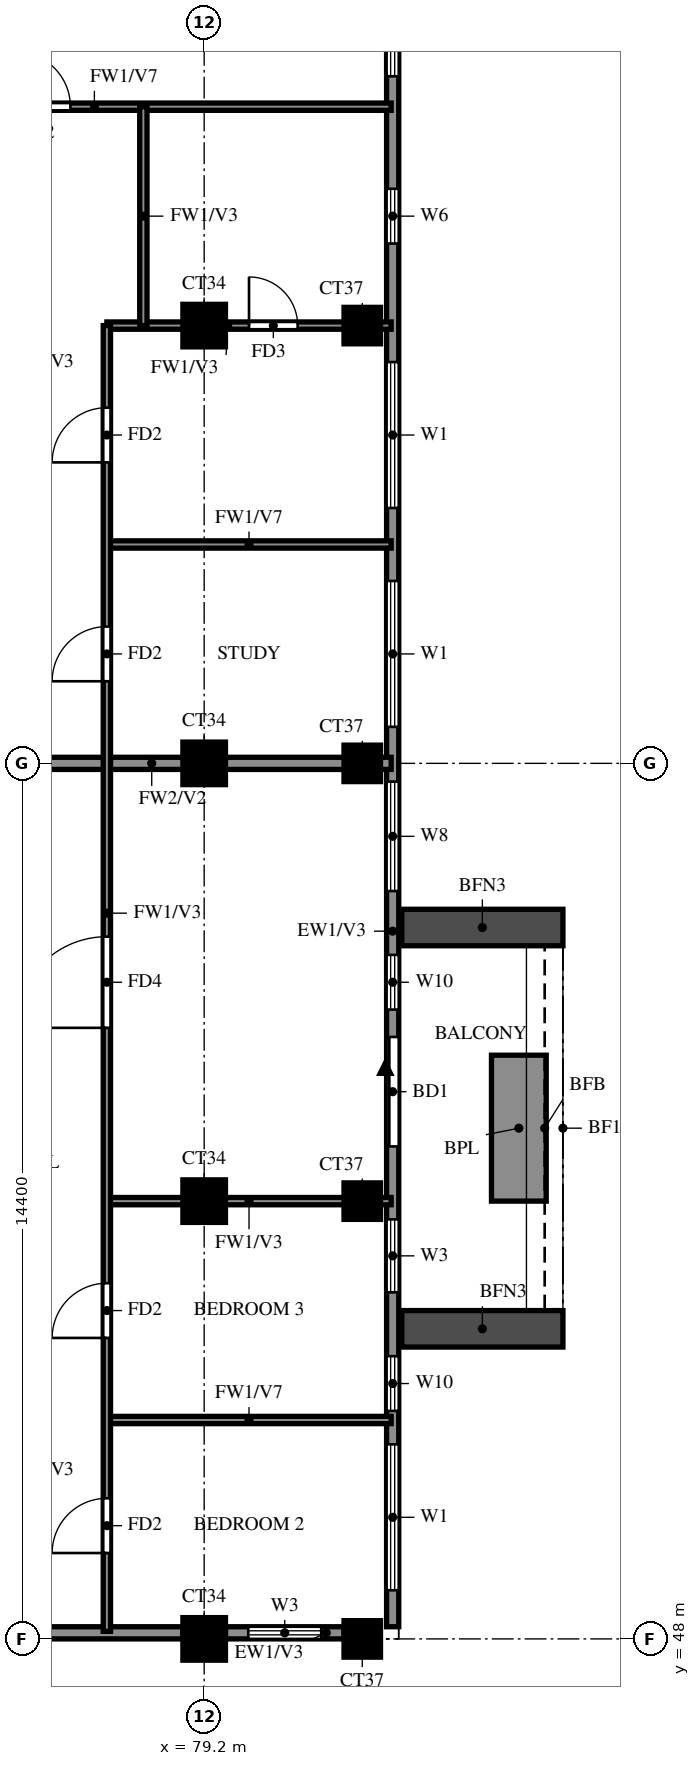
"""IFC4 building model, lengths in metres.
Left out: names, types, materials, properties, quantities, classifications, styles, units other than length and angle.
Written with IfcOpenShell. Run it as: python <this file> out.ifc"""

import sys

from ifc_helpers import new_model, si_unit, direction, frame, frame_2d, origin, origin_2d, place, context, subcontext, project, spatial, rectangle, extrude, source, transform, mapped, element, fill, save


model = new_model("IFC4")
c1 = context("Model", 3, precision=1e-05, world=origin(), true_north=direction((0.0, 1.0)))
c2 = subcontext(c1, "Body", "Model", "MODEL_VIEW")
j1 = project(units=[si_unit("LENGTHUNIT", "METRE"), si_unit("PLANEANGLEUNIT", "RADIAN")], contexts=[c1])
p1 = place(None, origin())
s1 = spatial("IfcSite", under=j1, at=p1, CompositionType="ELEMENT")
p2 = place(p1, origin())
s2 = spatial("IfcBuilding", under=s1, at=p2, CompositionType="ELEMENT")
p3 = place(p2, frame((0.0, 0.0, 257.0)))
s3 = spatial("IfcBuildingStorey", under=s2, at=p3, CompositionType="ELEMENT", Elevation=257.0)
m1 = source(origin(), c2, "Body", "SweptSolid", [
    extrude(rectangle(XDim=0.7, YDim=0.7, at=origin_2d()), origin(), (0.0, 0.0, 1.0), 3.22),
])
p4 = place(p3, frame((79.2, 48.0, 0.0), z_axis=(0.0, 0.0, 1.0), x_axis=(1.0, 0.0, 0.0)))
e1 = element("IfcColumn", 1, at=p4, inside=s3, PredefinedType="COLUMN", context=c2, shape_type="MappedRepresentation", body=[
    mapped(m1, transform((0.0, 0.0, 0.0))),
])
m2 = source(origin(), c2, "Body", "SweptSolid", [
    extrude(rectangle(XDim=0.6, YDim=0.6, at=origin_2d()), origin(), (0.0, 0.0, 1.0), 3.22),
])
p5 = place(p3, frame((81.8, 48.0, 0.0), z_axis=(0.0, 0.0, 1.0), x_axis=(1.0, 0.0, 0.0)))
e2 = element("IfcColumn", 2, at=p5, inside=s3, PredefinedType="COLUMN", context=c2, shape_type="MappedRepresentation", body=[
    mapped(m2, transform((0.0, 0.0, 0.0))),
])
p6 = place(p3, frame((79.2, 55.2, 0.0), z_axis=(0.0, 0.0, 1.0), x_axis=(1.0, 0.0, 0.0)))
e3 = element("IfcColumn", 3, at=p6, inside=s3, PredefinedType="COLUMN", context=c2, shape_type="MappedRepresentation", body=[
    mapped(m1, transform((0.0, 0.0, 0.0))),
])
p7 = place(p3, frame((81.8, 55.2, 0.0), z_axis=(0.0, 0.0, 1.0), x_axis=(1.0, 0.0, 0.0)))
e4 = element("IfcColumn", 4, at=p7, inside=s3, PredefinedType="COLUMN", context=c2, shape_type="MappedRepresentation", body=[
    mapped(m2, transform((0.0, 0.0, 0.0))),
])
p8 = place(p3, frame((79.2, 62.4, 0.0), z_axis=(0.0, 0.0, 1.0), x_axis=(1.0, 0.0, 0.0)))
e5 = element("IfcColumn", 5, at=p8, inside=s3, PredefinedType="COLUMN", context=c2, shape_type="MappedRepresentation", body=[
    mapped(m1, transform((0.0, 0.0, 0.0))),
])
p9 = place(p3, frame((81.8, 62.4, 0.0), z_axis=(0.0, 0.0, 1.0), x_axis=(1.0, 0.0, 0.0)))
e6 = element("IfcColumn", 6, at=p9, inside=s3, PredefinedType="COLUMN", context=c2, shape_type="MappedRepresentation", body=[
    mapped(m2, transform((0.0, 0.0, 0.0))),
])
p10 = place(p3, frame((79.2, 69.6, 0.0), z_axis=(0.0, 0.0, 1.0), x_axis=(1.0, 0.0, 0.0)))
e7 = element("IfcColumn", 7, at=p10, inside=s3, PredefinedType="COLUMN", context=c2, shape_type="MappedRepresentation", body=[
    mapped(m1, transform((0.0, 0.0, 0.0))),
])
p11 = place(p3, frame((81.8, 69.6, 0.0), z_axis=(0.0, 0.0, 1.0), x_axis=(1.0, 0.0, 0.0)))
e8 = element("IfcColumn", 8, at=p11, inside=s3, PredefinedType="COLUMN", context=c2, shape_type="MappedRepresentation", body=[
    mapped(m2, transform((0.0, 0.0, 0.0))),
])
p12 = place(p3, frame((81.907, 39.87, 0.0), z_axis=(0.0, 0.0, 1.0), x_axis=(-0.777936274417, 0.62834318087, 0.0)))
e9 = element("IfcWall", 9, at=p12, inside=s3, PredefinedType="SOLIDWALL", context=c2, shape_type="SweptSolid", body=[
    extrude(rectangle(XDim=13.099, YDim=0.2, at=frame_2d((6.549, 0.0))), origin(), (0.0, 0.0, 1.0), 3.22),
])
p13 = place(p12, frame((9.938, 0.0, 1.5)))
e10 = element("IfcOpeningElement", 10, at=p13, cuts=e9, PredefinedType="OPENING", context=c2, shape_type="SweptSolid", body=[
    extrude(rectangle(XDim=0.9, YDim=0.9, at=frame_2d((0.45, 0.45))), frame((0.0, 0.11, 0.0), z_axis=(0.0, -1.0, 0.0), x_axis=(1.0, 0.0, 0.0)), (0.0, 0.0, 1.0), 0.22),
])
p14 = place(p3, frame((71.987, 48.1, 0.0), z_axis=(0.0, 0.0, 1.0), x_axis=(1.0, 0.0, 0.0)))
e11 = element("IfcWall", 11, at=p14, inside=s3, PredefinedType="SOLIDWALL", context=c2, shape_type="SweptSolid", body=[
    extrude(rectangle(XDim=6.863, YDim=0.2, at=frame_2d((3.432, 0.0))), origin(), (0.0, 0.0, 1.0), 3.22),
])
p15 = place(p3, frame((79.55, 48.1, 0.0), z_axis=(0.0, 0.0, 1.0), x_axis=(1.0, 0.0, 0.0)))
e12 = element("IfcWall", 12, at=p15, inside=s3, PredefinedType="SOLIDWALL", context=c2, shape_type="SweptSolid", body=[
    extrude(rectangle(XDim=1.95, YDim=0.2, at=frame_2d((0.975, 0.0))), origin(), (0.0, 0.0, 1.0), 3.22),
])
p16 = place(p15, frame((0.375, 0.0, 0.6)))
e13 = element("IfcOpeningElement", 13, at=p16, cuts=e12, PredefinedType="OPENING", context=c2, shape_type="SweptSolid", body=[
    extrude(rectangle(XDim=1.2, YDim=2.4, at=frame_2d((0.6, 1.2))), frame((0.0, 0.11, 0.0), z_axis=(0.0, -1.0, 0.0), x_axis=(1.0, 0.0, 0.0)), (0.0, 0.0, 1.0), 0.22),
])
p17 = place(p3, frame((82.3, 48.2, 0.0), z_axis=(0.0, 0.0, 1.0), x_axis=(0.0, 1.0, 0.0)))
e14 = element("IfcWall", 14, at=p17, inside=s3, PredefinedType="SOLIDWALL", context=c2, shape_type="SweptSolid", body=[
    extrude(rectangle(XDim=28.6, YDim=0.2, at=frame_2d((14.3, 0.0))), origin(), (0.0, 0.0, 1.0), 3.22),
])
p18 = place(p17, frame((7.9, 0.0, 0.0)))
e15 = element("IfcOpeningElement", 15, at=p18, cuts=e14, PredefinedType="OPENING", context=c2, shape_type="SweptSolid", body=[
    extrude(rectangle(XDim=1.8, YDim=2.4, at=frame_2d((0.9, 1.2))), frame((0.0, 0.11, 0.0), z_axis=(0.0, -1.0, 0.0), x_axis=(1.0, 0.0, 0.0)), (0.0, 0.0, 1.0), 0.22),
])
p19 = place(p17, frame((0.6, 0.0, 0.6)))
e16 = element("IfcOpeningElement", 16, at=p19, cuts=e14, PredefinedType="OPENING", context=c2, shape_type="SweptSolid", body=[
    extrude(rectangle(XDim=2.4, YDim=2.4, at=frame_2d((1.2, 1.2))), frame((0.0, 0.11, 0.0), z_axis=(0.0, -1.0, 0.0), x_axis=(1.0, 0.0, 0.0)), (0.0, 0.0, 1.0), 0.22),
])
p20 = place(p17, frame((3.55, 0.0, 0.6)))
e17 = element("IfcOpeningElement", 17, at=p20, cuts=e14, PredefinedType="OPENING", context=c2, shape_type="SweptSolid", body=[
    extrude(rectangle(XDim=0.9, YDim=2.4, at=frame_2d((0.45, 1.2))), frame((0.0, 0.11, 0.0), z_axis=(0.0, -1.0, 0.0), x_axis=(1.0, 0.0, 0.0)), (0.0, 0.0, 1.0), 0.22),
])
p21 = place(p17, frame((5.5, 0.0, 0.6)))
e18 = element("IfcOpeningElement", 18, at=p21, cuts=e14, PredefinedType="OPENING", context=c2, shape_type="SweptSolid", body=[
    extrude(rectangle(XDim=1.2, YDim=2.4, at=frame_2d((0.6, 1.2))), frame((0.0, 0.11, 0.0), z_axis=(0.0, -1.0, 0.0), x_axis=(1.0, 0.0, 0.0)), (0.0, 0.0, 1.0), 0.22),
])
p22 = place(p17, frame((10.15, 0.0, 0.6)))
e19 = element("IfcOpeningElement", 19, at=p22, cuts=e14, PredefinedType="OPENING", context=c2, shape_type="SweptSolid", body=[
    extrude(rectangle(XDim=0.9, YDim=2.4, at=frame_2d((0.45, 1.2))), frame((0.0, 0.11, 0.0), z_axis=(0.0, -1.0, 0.0), x_axis=(1.0, 0.0, 0.0)), (0.0, 0.0, 1.0), 0.22),
])
p23 = place(p17, frame((12.1, 0.0, 0.6)))
e20 = element("IfcOpeningElement", 20, at=p23, cuts=e14, PredefinedType="OPENING", context=c2, shape_type="SweptSolid", body=[
    extrude(rectangle(XDim=1.8, YDim=2.4, at=frame_2d((0.9, 1.2))), frame((0.0, 0.11, 0.0), z_axis=(0.0, -1.0, 0.0), x_axis=(1.0, 0.0, 0.0)), (0.0, 0.0, 1.0), 0.22),
])
p24 = place(p17, frame((14.8, 0.0, 0.6)))
e21 = element("IfcOpeningElement", 21, at=p24, cuts=e14, PredefinedType="OPENING", context=c2, shape_type="SweptSolid", body=[
    extrude(rectangle(XDim=2.4, YDim=2.4, at=frame_2d((1.2, 1.2))), frame((0.0, 0.11, 0.0), z_axis=(0.0, -1.0, 0.0), x_axis=(1.0, 0.0, 0.0)), (0.0, 0.0, 1.0), 0.22),
])
p25 = place(p17, frame((18.4, 0.0, 0.6)))
e22 = element("IfcOpeningElement", 22, at=p25, cuts=e14, PredefinedType="OPENING", context=c2, shape_type="SweptSolid", body=[
    extrude(rectangle(XDim=2.4, YDim=2.4, at=frame_2d((1.2, 1.2))), frame((0.0, 0.11, 0.0), z_axis=(0.0, -1.0, 0.0), x_axis=(1.0, 0.0, 0.0)), (0.0, 0.0, 1.0), 0.22),
])
p26 = place(p17, frame((22.75, 0.0, 1.5)))
e23 = element("IfcOpeningElement", 23, at=p26, cuts=e14, PredefinedType="OPENING", context=c2, shape_type="SweptSolid", body=[
    extrude(rectangle(XDim=0.9, YDim=0.9, at=frame_2d((0.45, 0.45))), frame((0.0, 0.11, 0.0), z_axis=(0.0, -1.0, 0.0), x_axis=(1.0, 0.0, 0.0)), (0.0, 0.0, 1.0), 0.22),
])
p27 = place(p17, frame((25.5, 0.0, 0.6)))
e24 = element("IfcOpeningElement", 24, at=p27, cuts=e14, PredefinedType="OPENING", context=c2, shape_type="SweptSolid", body=[
    extrude(rectangle(XDim=2.4, YDim=2.4, at=frame_2d((1.2, 1.2))), frame((0.0, 0.11, 0.0), z_axis=(0.0, -1.0, 0.0), x_axis=(1.0, 0.0, 0.0)), (0.0, 0.0, 1.0), 0.22),
])
for number, where, z_axis, x_axis in (
    (25, (82.45, 53.1, 0.0), (0.0, 0.0, 1.0), (1.0, 0.0, 0.0)),
    (26, (82.45, 59.7, 0.0), (0.0, 0.0, 1.0), (1.0, 0.0, 0.0)),
):
    element("IfcWall", number, at=place(p3, frame(where, z_axis=z_axis, x_axis=x_axis)), inside=s3, PredefinedType="SOLIDWALL", context=c2, shape_type="SweptSolid", body=[
        extrude(rectangle(XDim=2.65, YDim=0.6, at=frame_2d((1.325, 0.0))), origin(), (0.0, 0.0, 1.0), 2.85),
    ])
p28 = place(p3, frame((84.375, 55.2, 0.0), z_axis=(0.0, 0.0, 1.0), x_axis=(0.0, 1.0, 0.0)))
e27 = element("IfcWall", 27, at=p28, inside=s3, PredefinedType="SOLIDWALL", context=c2, shape_type="SweptSolid", body=[
    extrude(rectangle(XDim=2.4, YDim=0.9, at=frame_2d((1.2, 0.0))), origin(), (0.0, 0.0, 1.0), 0.9),
])
p29 = place(p3, frame((74.4, 62.4, 0.0), z_axis=(0.0, 0.0, 1.0), x_axis=(1.0, 0.0, 0.0)))
e28 = element("IfcWall", 28, at=p29, inside=s3, PredefinedType="SOLIDWALL", context=c2, shape_type="SweptSolid", body=[
    extrude(rectangle(XDim=7.875, YDim=0.2, at=frame_2d((3.938, 0.0))), origin(), (0.0, 0.0, 1.0), 3.22),
])
p30 = place(p3, frame((77.6, 51.6, 0.0), z_axis=(0.0, 0.0, 1.0), x_axis=(1.0, 0.0, 0.0)))
e29 = element("IfcWall", 29, at=p30, inside=s3, PredefinedType="PARTITIONING", context=c2, shape_type="SweptSolid", body=[
    extrude(rectangle(XDim=4.675, YDim=0.12, at=frame_2d((2.337, 0.0))), origin(), (0.0, 0.0, 1.0), 2.32),
])
p31 = place(p3, frame((77.6, 55.2, 0.0), z_axis=(0.0, 0.0, 1.0), x_axis=(1.0, 0.0, 0.0)))
e30 = element("IfcWall", 30, at=p31, inside=s3, PredefinedType="PARTITIONING", context=c2, shape_type="SweptSolid", body=[
    extrude(rectangle(XDim=4.675, YDim=0.12, at=frame_2d((2.337, 0.0))), origin(), (0.0, 0.0, 1.0), 3.22),
])
p32 = place(p3, frame((77.6, 66.0, 0.0), z_axis=(0.0, 0.0, 1.0), x_axis=(1.0, 0.0, 0.0)))
e31 = element("IfcWall", 31, at=p32, inside=s3, PredefinedType="PARTITIONING", context=c2, shape_type="SweptSolid", body=[
    extrude(rectangle(XDim=4.675, YDim=0.12, at=frame_2d((2.337, 0.0))), origin(), (0.0, 0.0, 1.0), 2.32),
])
p33 = place(p3, frame((77.6, 69.6, 0.0), z_axis=(0.0, 0.0, 1.0), x_axis=(1.0, 0.0, 0.0)))
e32 = element("IfcWall", 32, at=p33, inside=s3, PredefinedType="PARTITIONING", context=c2, shape_type="SweptSolid", body=[
    extrude(rectangle(XDim=4.675, YDim=0.12, at=frame_2d((2.337, 0.0))), origin(), (0.0, 0.0, 1.0), 3.22),
])
p34 = place(p33, frame((2.337, 0.0, 0.0)))
e33 = element("IfcOpeningElement", 33, at=p34, cuts=e32, PredefinedType="OPENING", context=c2, shape_type="SweptSolid", body=[
    extrude(rectangle(XDim=0.8, YDim=2.1, at=frame_2d((0.4, 1.05))), frame((0.0, 0.07, 0.0), z_axis=(0.0, -1.0, 0.0), x_axis=(1.0, 0.0, 0.0)), (0.0, 0.0, 1.0), 0.14),
])
p35 = place(p3, frame((72.0, 73.2, 0.0), z_axis=(0.0, 0.0, 1.0), x_axis=(1.0, 0.0, 0.0)))
e34 = element("IfcWall", 34, at=p35, inside=s3, PredefinedType="PARTITIONING", context=c2, shape_type="SweptSolid", body=[
    extrude(rectangle(XDim=10.275, YDim=0.12, at=frame_2d((5.137, 0.0))), origin(), (0.0, 0.0, 1.0), 2.32),
])
p36 = place(p35, frame((4.1, 0.0, 0.0)))
e35 = element("IfcOpeningElement", 35, at=p36, cuts=e34, PredefinedType="OPENING", context=c2, shape_type="SweptSolid", body=[
    extrude(rectangle(XDim=0.9, YDim=2.1, at=frame_2d((0.45, 1.05))), frame((0.0, 0.07, 0.0), z_axis=(0.0, -1.0, 0.0), x_axis=(1.0, 0.0, 0.0)), (0.0, 0.0, 1.0), 0.14),
])
p37 = place(p3, frame((77.6, 48.125, 0.0), z_axis=(0.0, 0.0, 1.0), x_axis=(0.0, 1.0, 0.0)))
e36 = element("IfcWall", 36, at=p37, inside=s3, PredefinedType="PARTITIONING", context=c2, shape_type="SweptSolid", body=[
    extrude(rectangle(XDim=21.475, YDim=0.12, at=frame_2d((10.738, 0.0))), origin(), (0.0, 0.0, 1.0), 3.22),
])
p38 = place(p37, frame((1.288, 0.0, 0.0)))
e37 = element("IfcOpeningElement", 37, at=p38, cuts=e36, PredefinedType="OPENING", context=c2, shape_type="SweptSolid", body=[
    extrude(rectangle(XDim=0.9, YDim=2.1, at=frame_2d((0.45, 1.05))), frame((0.0, 0.07, 0.0), z_axis=(0.0, -1.0, 0.0), x_axis=(1.0, 0.0, 0.0)), (0.0, 0.0, 1.0), 0.14),
])
p39 = place(p37, frame((4.825, 0.0, 0.0)))
e38 = element("IfcOpeningElement", 38, at=p39, cuts=e36, PredefinedType="OPENING", context=c2, shape_type="SweptSolid", body=[
    extrude(rectangle(XDim=0.9, YDim=2.1, at=frame_2d((0.45, 1.05))), frame((0.0, 0.07, 0.0), z_axis=(0.0, -1.0, 0.0), x_axis=(1.0, 0.0, 0.0)), (0.0, 0.0, 1.0), 0.14),
])
p40 = place(p37, frame((9.925, 0.0, 0.0)))
e39 = element("IfcOpeningElement", 39, at=p40, cuts=e36, PredefinedType="OPENING", context=c2, shape_type="SweptSolid", body=[
    extrude(rectangle(XDim=1.5, YDim=2.1, at=frame_2d((0.75, 1.05))), frame((0.0, 0.07, 0.0), z_axis=(0.0, -1.0, 0.0), x_axis=(1.0, 0.0, 0.0)), (0.0, 0.0, 1.0), 0.14),
])
p41 = place(p37, frame((15.625, 0.0, 0.0)))
e40 = element("IfcOpeningElement", 40, at=p41, cuts=e36, PredefinedType="OPENING", context=c2, shape_type="SweptSolid", body=[
    extrude(rectangle(XDim=0.9, YDim=2.1, at=frame_2d((0.45, 1.05))), frame((0.0, 0.07, 0.0), z_axis=(0.0, -1.0, 0.0), x_axis=(1.0, 0.0, 0.0)), (0.0, 0.0, 1.0), 0.14),
])
p42 = place(p37, frame((19.225, 0.0, 0.0)))
e41 = element("IfcOpeningElement", 41, at=p42, cuts=e36, PredefinedType="OPENING", context=c2, shape_type="SweptSolid", body=[
    extrude(rectangle(XDim=0.9, YDim=2.1, at=frame_2d((0.45, 1.05))), frame((0.0, 0.07, 0.0), z_axis=(0.0, -1.0, 0.0), x_axis=(1.0, 0.0, 0.0)), (0.0, 0.0, 1.0), 0.14),
])
p43 = place(p3, frame((78.2, 69.6, 0.0), z_axis=(0.0, 0.0, 1.0), x_axis=(0.0, 1.0, 0.0)))
e42 = element("IfcWall", 42, at=p43, inside=s3, PredefinedType="PARTITIONING", context=c2, shape_type="SweptSolid", body=[
    extrude(rectangle(XDim=3.6, YDim=0.12, at=frame_2d((1.8, 0.0))), origin(), (0.0, 0.0, 1.0), 3.22),
])
p44 = place(p16, origin())
e43 = element("IfcWindow", 43, at=p44, inside=s3, PartitioningType="SINGLE_PANEL", PredefinedType="WINDOW", context=c2, shape_type="SweptSolid", body=[
    extrude(rectangle(XDim=1.2, YDim=2.4, at=frame_2d((0.6, 1.2))), frame((0.0, 0.03, 0.0), z_axis=(0.0, -1.0, 0.0), x_axis=(1.0, 0.0, 0.0)), (0.0, 0.0, 1.0), 0.06),
])
fill(e13, e43)
p45 = place(p18, origin())
e44 = element("IfcDoor", 44, at=p45, inside=s3, OperationType="DOUBLE_DOOR_SLIDING", PredefinedType="DOOR", context=c2, shape_type="SweptSolid", body=[
    extrude(rectangle(XDim=1.8, YDim=2.4, at=frame_2d((0.9, 1.2))), frame((0.0, 0.025, 0.0), z_axis=(0.0, -1.0, 0.0), x_axis=(1.0, 0.0, 0.0)), (0.0, 0.0, 1.0), 0.05),
])
fill(e15, e44)
p46 = place(p19, origin())
e45 = element("IfcWindow", 45, at=p46, inside=s3, PartitioningType="DOUBLE_PANEL_VERTICAL", PredefinedType="WINDOW", context=c2, shape_type="SweptSolid", body=[
    extrude(rectangle(XDim=2.4, YDim=2.4, at=frame_2d((1.2, 1.2))), frame((0.0, 0.03, 0.0), z_axis=(0.0, -1.0, 0.0), x_axis=(1.0, 0.0, 0.0)), (0.0, 0.0, 1.0), 0.06),
])
fill(e16, e45)
p47 = place(p20, origin())
e46 = element("IfcWindow", 46, at=p47, inside=s3, PartitioningType="SINGLE_PANEL", PredefinedType="WINDOW", context=c2, shape_type="SweptSolid", body=[
    extrude(rectangle(XDim=0.9, YDim=2.4, at=frame_2d((0.45, 1.2))), frame((0.0, 0.03, 0.0), z_axis=(0.0, -1.0, 0.0), x_axis=(1.0, 0.0, 0.0)), (0.0, 0.0, 1.0), 0.06),
])
fill(e17, e46)
p48 = place(p21, origin())
e47 = element("IfcWindow", 47, at=p48, inside=s3, PartitioningType="SINGLE_PANEL", PredefinedType="WINDOW", context=c2, shape_type="SweptSolid", body=[
    extrude(rectangle(XDim=1.2, YDim=2.4, at=frame_2d((0.6, 1.2))), frame((0.0, 0.03, 0.0), z_axis=(0.0, -1.0, 0.0), x_axis=(1.0, 0.0, 0.0)), (0.0, 0.0, 1.0), 0.06),
])
fill(e18, e47)
p49 = place(p22, origin())
e48 = element("IfcWindow", 48, at=p49, inside=s3, PartitioningType="SINGLE_PANEL", PredefinedType="WINDOW", context=c2, shape_type="SweptSolid", body=[
    extrude(rectangle(XDim=0.9, YDim=2.4, at=frame_2d((0.45, 1.2))), frame((0.0, 0.03, 0.0), z_axis=(0.0, -1.0, 0.0), x_axis=(1.0, 0.0, 0.0)), (0.0, 0.0, 1.0), 0.06),
])
fill(e19, e48)
p50 = place(p23, origin())
e49 = element("IfcWindow", 49, at=p50, inside=s3, PartitioningType="DOUBLE_PANEL_VERTICAL", PredefinedType="WINDOW", context=c2, shape_type="SweptSolid", body=[
    extrude(rectangle(XDim=1.8, YDim=2.4, at=frame_2d((0.9, 1.2))), frame((0.0, 0.03, 0.0), z_axis=(0.0, -1.0, 0.0), x_axis=(1.0, 0.0, 0.0)), (0.0, 0.0, 1.0), 0.06),
])
fill(e20, e49)
p51 = place(p24, origin())
e50 = element("IfcWindow", 50, at=p51, inside=s3, PartitioningType="DOUBLE_PANEL_VERTICAL", PredefinedType="WINDOW", context=c2, shape_type="SweptSolid", body=[
    extrude(rectangle(XDim=2.4, YDim=2.4, at=frame_2d((1.2, 1.2))), frame((0.0, 0.03, 0.0), z_axis=(0.0, -1.0, 0.0), x_axis=(1.0, 0.0, 0.0)), (0.0, 0.0, 1.0), 0.06),
])
fill(e21, e50)
p52 = place(p25, origin())
e51 = element("IfcWindow", 51, at=p52, inside=s3, PartitioningType="DOUBLE_PANEL_VERTICAL", PredefinedType="WINDOW", context=c2, shape_type="SweptSolid", body=[
    extrude(rectangle(XDim=2.4, YDim=2.4, at=frame_2d((1.2, 1.2))), frame((0.0, 0.03, 0.0), z_axis=(0.0, -1.0, 0.0), x_axis=(1.0, 0.0, 0.0)), (0.0, 0.0, 1.0), 0.06),
])
fill(e22, e51)
p53 = place(p26, origin())
e52 = element("IfcWindow", 52, at=p53, inside=s3, PartitioningType="SINGLE_PANEL", PredefinedType="WINDOW", context=c2, shape_type="SweptSolid", body=[
    extrude(rectangle(XDim=0.9, YDim=0.9, at=frame_2d((0.45, 0.45))), frame((0.0, 0.03, 0.0), z_axis=(0.0, -1.0, 0.0), x_axis=(1.0, 0.0, 0.0)), (0.0, 0.0, 1.0), 0.06),
])
fill(e23, e52)
p54 = place(p27, origin())
e53 = element("IfcWindow", 53, at=p54, inside=s3, PartitioningType="DOUBLE_PANEL_VERTICAL", PredefinedType="WINDOW", context=c2, shape_type="SweptSolid", body=[
    extrude(rectangle(XDim=2.4, YDim=2.4, at=frame_2d((1.2, 1.2))), frame((0.0, 0.03, 0.0), z_axis=(0.0, -1.0, 0.0), x_axis=(1.0, 0.0, 0.0)), (0.0, 0.0, 1.0), 0.06),
])
fill(e24, e53)
p55 = place(p38, origin())
e54 = element("IfcDoor", 54, at=p55, inside=s3, OperationType="SINGLE_SWING_LEFT", PredefinedType="DOOR", context=c2, shape_type="SweptSolid", body=[
    extrude(rectangle(XDim=0.9, YDim=2.1, at=frame_2d((0.45, 1.05))), frame((0.0, 0.025, 0.0), z_axis=(0.0, -1.0, 0.0), x_axis=(1.0, 0.0, 0.0)), (0.0, 0.0, 1.0), 0.05),
])
fill(e37, e54)
p56 = place(p39, origin())
e55 = element("IfcDoor", 55, at=p56, inside=s3, OperationType="SINGLE_SWING_LEFT", PredefinedType="DOOR", context=c2, shape_type="SweptSolid", body=[
    extrude(rectangle(XDim=0.9, YDim=2.1, at=frame_2d((0.45, 1.05))), frame((0.0, 0.025, 0.0), z_axis=(0.0, -1.0, 0.0), x_axis=(1.0, 0.0, 0.0)), (0.0, 0.0, 1.0), 0.05),
])
fill(e38, e55)
p57 = place(p40, origin())
e56 = element("IfcDoor", 56, at=p57, inside=s3, OperationType="SINGLE_SWING_RIGHT", PredefinedType="DOOR", context=c2, shape_type="SweptSolid", body=[
    extrude(rectangle(XDim=1.5, YDim=2.1, at=frame_2d((0.75, 1.05))), frame((0.0, 0.025, 0.0), z_axis=(0.0, -1.0, 0.0), x_axis=(1.0, 0.0, 0.0)), (0.0, 0.0, 1.0), 0.05),
])
fill(e39, e56)
p58 = place(p41, origin())
e57 = element("IfcDoor", 57, at=p58, inside=s3, OperationType="SINGLE_SWING_RIGHT", PredefinedType="DOOR", context=c2, shape_type="SweptSolid", body=[
    extrude(rectangle(XDim=0.9, YDim=2.1, at=frame_2d((0.45, 1.05))), frame((0.0, 0.025, 0.0), z_axis=(0.0, -1.0, 0.0), x_axis=(1.0, 0.0, 0.0)), (0.0, 0.0, 1.0), 0.05),
])
fill(e40, e57)
p59 = place(p42, origin())
e58 = element("IfcDoor", 58, at=p59, inside=s3, OperationType="SINGLE_SWING_LEFT", PredefinedType="DOOR", context=c2, shape_type="SweptSolid", body=[
    extrude(rectangle(XDim=0.9, YDim=2.1, at=frame_2d((0.45, 1.05))), frame((0.0, 0.025, 0.0), z_axis=(0.0, -1.0, 0.0), x_axis=(1.0, 0.0, 0.0)), (0.0, 0.0, 1.0), 0.05),
])
fill(e41, e58)
p60 = place(p34, origin())
e59 = element("IfcDoor", 59, at=p60, inside=s3, OperationType="SINGLE_SWING_RIGHT", PredefinedType="DOOR", context=c2, shape_type="SweptSolid", body=[
    extrude(rectangle(XDim=0.8, YDim=2.1, at=frame_2d((0.4, 1.05))), frame((0.0, 0.025, 0.0), z_axis=(0.0, -1.0, 0.0), x_axis=(1.0, 0.0, 0.0)), (0.0, 0.0, 1.0), 0.05),
])
fill(e33, e59)
p61 = place(p36, origin())
e60 = element("IfcDoor", 60, at=p61, inside=s3, OperationType="SINGLE_SWING_RIGHT", PredefinedType="DOOR", context=c2, shape_type="SweptSolid", body=[
    extrude(rectangle(XDim=0.9, YDim=2.1, at=frame_2d((0.45, 1.05))), frame((0.0, 0.025, 0.0), z_axis=(0.0, -1.0, 0.0), x_axis=(1.0, 0.0, 0.0)), (0.0, 0.0, 1.0), 0.05),
])
fill(e35, e60)
save(model, sys.argv[1])
